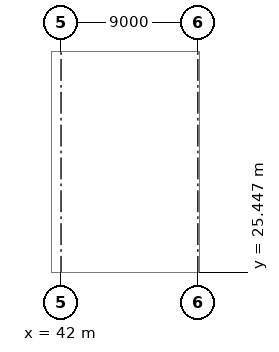
"""IFC4 building model, lengths in metres.
Left out: names, types, materials, properties, quantities, classifications, styles, units other than length and angle.
Written with IfcOpenShell. Run it as: python <this file> out.ifc"""

import sys

from ifc_helpers import new_model, si_unit, direction, frame, origin, origin_2d, place, context, subcontext, project, spatial, rectangle, extrude, element, save


model = new_model("IFC4")
c1 = context("Model", 3, precision=1e-05, world=origin(), true_north=direction((0.0, 1.0)))
c2 = subcontext(c1, "Body", "Model", "MODEL_VIEW")
j1 = project(units=[si_unit("LENGTHUNIT", "METRE"), si_unit("PLANEANGLEUNIT", "RADIAN")], contexts=[c1])
p1 = place(None, origin())
s1 = spatial("IfcSite", under=j1, at=p1, CompositionType="ELEMENT")
p2 = place(p1, origin())
s2 = spatial("IfcBuilding", under=s1, at=p2, CompositionType="ELEMENT")
p3 = place(p2, origin())
s3 = spatial("IfcBuildingStorey", under=s2, at=p3, CompositionType="ELEMENT", Elevation=0.0)
p4 = place(p3, frame((42.0, 33.7, -0.3), z_axis=(0.0, 0.0, 1.0), x_axis=(1.0, 0.0, 0.0)))
e1 = element("IfcColumn", 1, at=p4, inside=s3, PredefinedType="COLUMN", context=c2, shape_type="SweptSolid", body=[
    extrude(rectangle(XDim=1.0, YDim=1.4, at=origin_2d()), origin(), (0.0, 0.0, 1.0), 5.3),
])
for number, where, z_axis, x_axis in (
    (2, (50.5, 33.7, -0.3), (0.0, 0.0, 1.0), (1.0, 0.0, 0.0)),
    (3, (51.5, 33.7, -0.3), (0.0, 0.0, 1.0), (1.0, 0.0, 0.0)),
):
    element("IfcColumn", number, at=place(p3, frame(where, z_axis=z_axis, x_axis=x_axis)), inside=s3, PredefinedType="COLUMN", context=c2, shape_type="SweptSolid", body=[
        extrude(rectangle(XDim=0.8, YDim=1.2, at=origin_2d()), origin(), (0.0, 0.0, 1.0), 5.3),
    ])
save(model, sys.argv[1])
